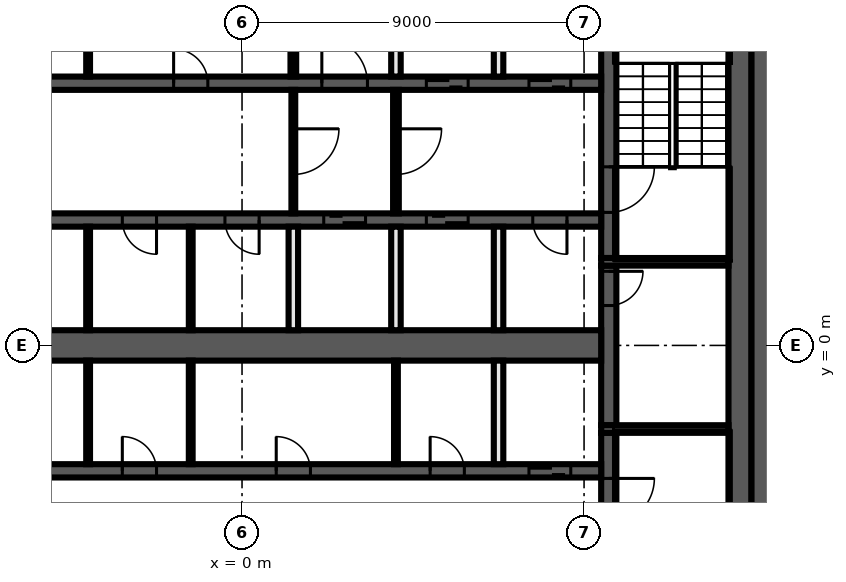
"""IFC4 building model, lengths in metres.
Left out: names, types, materials, properties, quantities, classifications, styles, units other than length and angle.
Written with IfcOpenShell. Run it as: python <this file> out.ifc"""

import sys

from ifc_helpers import new_model, si_unit, direction, frame, frame_2d, origin, place, context, subcontext, project, spatial, rectangle, extrude, element, fill, save


model = new_model("IFC4")
c1 = context("Model", 3, precision=1e-05, world=origin(), true_north=direction((0.0, 1.0)))
c2 = subcontext(c1, "Body", "Model", "MODEL_VIEW")
j1 = project(units=[si_unit("LENGTHUNIT", "METRE"), si_unit("PLANEANGLEUNIT", "RADIAN")], contexts=[c1])
p1 = place(None, origin())
s1 = spatial("IfcSite", under=j1, at=p1, CompositionType="ELEMENT")
p2 = place(p1, origin())
s2 = spatial("IfcBuilding", under=s1, at=p2, CompositionType="ELEMENT")
p3 = place(p2, frame((0.0, 0.0, 353.0)))
s3 = spatial("IfcBuildingStorey", under=s2, at=p3, CompositionType="ELEMENT", Elevation=353.0)
p4 = place(p3, frame((13.7, 10.4, 0.0), z_axis=(0.0, 0.0, 1.0), x_axis=(0.0, -1.0, 0.0)))
e1 = element("IfcWall", 1, at=p4, inside=s3, PredefinedType="SHEAR", context=c2, shape_type="SweptSolid", body=[
    extrude(rectangle(XDim=20.8, YDim=0.6, at=frame_2d((10.4, 0.0))), origin(), (0.0, 0.0, 1.0), 5.6),
])
p5 = place(p3, frame((13.1, 9.8, 0.0), z_axis=(0.0, 0.0, 1.0), x_axis=(0.0, -1.0, 0.0)))
e2 = element("IfcWall", 2, at=p5, inside=s3, PredefinedType="SHEAR", context=c2, shape_type="SweptSolid", body=[
    extrude(rectangle(XDim=19.6, YDim=0.6, at=frame_2d((9.8, 0.0))), origin(), (0.0, 0.0, 1.0), 5.6),
])
p6 = place(p3, frame((9.65, -2.3, 0.0), z_axis=(0.0, 0.0, 1.0), x_axis=(0.0, -1.0, 0.0)))
e3 = element("IfcWall", 3, at=p6, inside=s3, PredefinedType="SHEAR", context=c2, shape_type="SweptSolid", body=[
    extrude(rectangle(XDim=7.5, YDim=0.4, at=frame_2d((3.75, 0.0))), origin(), (0.0, 0.0, 1.0), 5.6),
])
p7 = place(p6, frame((1.2, 0.0, 0.0)))
e4 = element("IfcOpeningElement", 4, at=p7, cuts=e3, PredefinedType="OPENING", context=c2, shape_type="SweptSolid", body=[
    extrude(rectangle(XDim=1.2, YDim=2.1, at=frame_2d((0.6, 1.05))), frame((0.0, 0.21, 0.0), z_axis=(0.0, -1.0, 0.0), x_axis=(1.0, 0.0, 0.0)), (0.0, 0.0, 1.0), 0.42),
])
p8 = place(p3, frame((9.65, 2.1, 0.0), z_axis=(0.0, 0.0, 1.0), x_axis=(0.0, -1.0, 0.0)))
e5 = element("IfcWall", 5, at=p8, inside=s3, PredefinedType="SHEAR", context=c2, shape_type="SweptSolid", body=[
    extrude(rectangle(XDim=4.2, YDim=0.4, at=frame_2d((2.1, 0.0))), origin(), (0.0, 0.0, 1.0), 5.6),
])
p9 = place(p8, frame((0.15, 0.0, 0.0)))
e6 = element("IfcOpeningElement", 6, at=p9, cuts=e5, PredefinedType="OPENING", context=c2, shape_type="SweptSolid", body=[
    extrude(rectangle(XDim=0.9, YDim=2.1, at=frame_2d((0.45, 1.05))), frame((0.0, 0.21, 0.0), z_axis=(0.0, -1.0, 0.0), x_axis=(1.0, 0.0, 0.0)), (0.0, 0.0, 1.0), 0.42),
])
p10 = place(p3, frame((9.65, 9.8, 0.0), z_axis=(0.0, 0.0, 1.0), x_axis=(0.0, -1.0, 0.0)))
e7 = element("IfcWall", 7, at=p10, inside=s3, PredefinedType="SHEAR", context=c2, shape_type="SweptSolid", body=[
    extrude(rectangle(XDim=7.5, YDim=0.4, at=frame_2d((3.75, 0.0))), origin(), (0.0, 0.0, 1.0), 5.6),
])
p11 = place(p10, frame((5.1, 0.0, 0.0)))
e8 = element("IfcOpeningElement", 8, at=p11, cuts=e7, PredefinedType="OPENING", context=c2, shape_type="SweptSolid", body=[
    extrude(rectangle(XDim=1.2, YDim=2.1, at=frame_2d((0.6, 1.05))), frame((0.0, 0.21, 0.0), z_axis=(0.0, -1.0, 0.0), x_axis=(1.0, 0.0, 0.0)), (0.0, 0.0, 1.0), 0.42),
])
for number, where, z_axis, x_axis in (
    (9, (9.45, 2.2, 0.0), (0.0, 0.0, 1.0), (1.0, 0.0, 0.0)),
    (10, (9.45, -2.2, 0.0), (0.0, 0.0, 1.0), (1.0, 0.0, 0.0)),
):
    element("IfcWall", number, at=place(p3, frame(where, z_axis=z_axis, x_axis=x_axis)), inside=s3, PredefinedType="SHEAR", context=c2, shape_type="SweptSolid", body=[
        extrude(rectangle(XDim=3.35, YDim=0.2, at=frame_2d((1.675, 0.0))), origin(), (0.0, 0.0, 1.0), 5.6),
    ])
p12 = place(p3, frame((-9.45, 6.9, 0.0), z_axis=(0.0, 0.0, 1.0), x_axis=(1.0, 0.0, 0.0)))
e11 = element("IfcWall", 11, at=p12, inside=s3, PredefinedType="SHEAR", context=c2, shape_type="SweptSolid", body=[
    extrude(rectangle(XDim=18.9, YDim=0.35, at=frame_2d((9.45, 0.0))), origin(), (0.0, 0.0, 1.0), 5.6),
])
p13 = place(p12, frame((11.55, 0.0, 0.0)))
e12 = element("IfcOpeningElement", 12, at=p13, cuts=e11, PredefinedType="OPENING", context=c2, shape_type="SweptSolid", body=[
    extrude(rectangle(XDim=1.2, YDim=2.1, at=frame_2d((0.6, 1.05))), frame((0.0, 0.185, 0.0), z_axis=(0.0, -1.0, 0.0), x_axis=(1.0, 0.0, 0.0)), (0.0, 0.0, 1.0), 0.37),
])
p14 = place(p12, frame((14.3, 0.0, 0.0)))
e13 = element("IfcOpeningElement", 13, at=p14, cuts=e11, PredefinedType="OPENING", context=c2, shape_type="SweptSolid", body=[
    extrude(rectangle(XDim=1.1, YDim=2.1, at=frame_2d((0.55, 1.05))), frame((0.0, 0.185, 0.0), z_axis=(0.0, -1.0, 0.0), x_axis=(1.0, 0.0, 0.0)), (0.0, 0.0, 1.0), 0.37),
])
p15 = place(p12, frame((17.0, 0.0, 0.0)))
e14 = element("IfcOpeningElement", 14, at=p15, cuts=e11, PredefinedType="OPENING", context=c2, shape_type="SweptSolid", body=[
    extrude(rectangle(XDim=1.1, YDim=2.1, at=frame_2d((0.55, 1.05))), frame((0.0, 0.185, 0.0), z_axis=(0.0, -1.0, 0.0), x_axis=(1.0, 0.0, 0.0)), (0.0, 0.0, 1.0), 0.37),
])
p16 = place(p12, frame((2.25, 0.0, 0.0)))
e15 = element("IfcOpeningElement", 15, at=p16, cuts=e11, PredefinedType="OPENING", context=c2, shape_type="SweptSolid", body=[
    extrude(rectangle(XDim=0.9, YDim=2.1, at=frame_2d((0.45, 1.05))), frame((0.0, 0.185, 0.0), z_axis=(0.0, -1.0, 0.0), x_axis=(1.0, 0.0, 0.0)), (0.0, 0.0, 1.0), 0.37),
])
p17 = place(p12, frame((7.65, 0.0, 0.0)))
e16 = element("IfcOpeningElement", 16, at=p17, cuts=e11, PredefinedType="OPENING", context=c2, shape_type="SweptSolid", body=[
    extrude(rectangle(XDim=0.9, YDim=2.1, at=frame_2d((0.45, 1.05))), frame((0.0, 0.185, 0.0), z_axis=(0.0, -1.0, 0.0), x_axis=(1.0, 0.0, 0.0)), (0.0, 0.0, 1.0), 0.37),
])
p18 = place(p3, frame((9.45, 3.3, 0.0), z_axis=(0.0, 0.0, 1.0), x_axis=(-1.0, 0.0, 0.0)))
e17 = element("IfcWall", 17, at=p18, inside=s3, PredefinedType="SHEAR", context=c2, shape_type="SweptSolid", body=[
    extrude(rectangle(XDim=18.9, YDim=0.35, at=frame_2d((9.45, 0.0))), origin(), (0.0, 0.0, 1.0), 5.6),
])
p19 = place(p18, frame((6.2, 0.0, 0.0)))
e18 = element("IfcOpeningElement", 18, at=p19, cuts=e17, PredefinedType="OPENING", context=c2, shape_type="SweptSolid", body=[
    extrude(rectangle(XDim=1.1, YDim=2.1, at=frame_2d((0.55, 1.05))), frame((0.0, 0.185, 0.0), z_axis=(0.0, -1.0, 0.0), x_axis=(1.0, 0.0, 0.0)), (0.0, 0.0, 1.0), 0.37),
])
p20 = place(p18, frame((3.5, 0.0, 0.0)))
e19 = element("IfcOpeningElement", 19, at=p20, cuts=e17, PredefinedType="OPENING", context=c2, shape_type="SweptSolid", body=[
    extrude(rectangle(XDim=1.1, YDim=2.1, at=frame_2d((0.55, 1.05))), frame((0.0, 0.185, 0.0), z_axis=(0.0, -1.0, 0.0), x_axis=(1.0, 0.0, 0.0)), (0.0, 0.0, 1.0), 0.37),
])
p21 = place(p18, frame((0.9, 0.0, 0.0)))
e20 = element("IfcOpeningElement", 20, at=p21, cuts=e17, PredefinedType="OPENING", context=c2, shape_type="SweptSolid", body=[
    extrude(rectangle(XDim=0.9, YDim=2.1, at=frame_2d((0.45, 1.05))), frame((0.0, 0.185, 0.0), z_axis=(0.0, -1.0, 0.0), x_axis=(1.0, 0.0, 0.0)), (0.0, 0.0, 1.0), 0.37),
])
p22 = place(p18, frame((15.75, 0.0, 0.0)))
e21 = element("IfcOpeningElement", 21, at=p22, cuts=e17, PredefinedType="OPENING", context=c2, shape_type="SweptSolid", body=[
    extrude(rectangle(XDim=0.9, YDim=2.1, at=frame_2d((0.45, 1.05))), frame((0.0, 0.185, 0.0), z_axis=(0.0, -1.0, 0.0), x_axis=(1.0, 0.0, 0.0)), (0.0, 0.0, 1.0), 0.37),
])
p23 = place(p18, frame((11.7, 0.0, 0.0)))
e22 = element("IfcOpeningElement", 22, at=p23, cuts=e17, PredefinedType="OPENING", context=c2, shape_type="SweptSolid", body=[
    extrude(rectangle(XDim=0.9, YDim=2.1, at=frame_2d((0.45, 1.05))), frame((0.0, 0.185, 0.0), z_axis=(0.0, -1.0, 0.0), x_axis=(1.0, 0.0, 0.0)), (0.0, 0.0, 1.0), 0.37),
])
p24 = place(p18, frame((9.0, 0.0, 0.0)))
e23 = element("IfcOpeningElement", 23, at=p24, cuts=e17, PredefinedType="OPENING", context=c2, shape_type="SweptSolid", body=[
    extrude(rectangle(XDim=0.9, YDim=2.1, at=frame_2d((0.45, 1.05))), frame((0.0, 0.185, 0.0), z_axis=(0.0, -1.0, 0.0), x_axis=(1.0, 0.0, 0.0)), (0.0, 0.0, 1.0), 0.37),
])
p25 = place(p3, frame((-9.45, -3.3, 0.0), z_axis=(0.0, 0.0, 1.0), x_axis=(1.0, 0.0, 0.0)))
e24 = element("IfcWall", 24, at=p25, inside=s3, PredefinedType="SHEAR", context=c2, shape_type="SweptSolid", body=[
    extrude(rectangle(XDim=18.9, YDim=0.35, at=frame_2d((9.45, 0.0))), origin(), (0.0, 0.0, 1.0), 5.6),
])
p26 = place(p25, frame((17.0, 0.0, 0.0)))
e25 = element("IfcOpeningElement", 25, at=p26, cuts=e24, PredefinedType="OPENING", context=c2, shape_type="SweptSolid", body=[
    extrude(rectangle(XDim=1.1, YDim=2.1, at=frame_2d((0.55, 1.05))), frame((0.0, 0.185, 0.0), z_axis=(0.0, -1.0, 0.0), x_axis=(1.0, 0.0, 0.0)), (0.0, 0.0, 1.0), 0.37),
])
p27 = place(p25, frame((2.25, 0.0, 0.0)))
e26 = element("IfcOpeningElement", 26, at=p27, cuts=e24, PredefinedType="OPENING", context=c2, shape_type="SweptSolid", body=[
    extrude(rectangle(XDim=0.9, YDim=2.1, at=frame_2d((0.45, 1.05))), frame((0.0, 0.185, 0.0), z_axis=(0.0, -1.0, 0.0), x_axis=(1.0, 0.0, 0.0)), (0.0, 0.0, 1.0), 0.37),
])
p28 = place(p25, frame((6.3, 0.0, 0.0)))
e27 = element("IfcOpeningElement", 27, at=p28, cuts=e24, PredefinedType="OPENING", context=c2, shape_type="SweptSolid", body=[
    extrude(rectangle(XDim=0.9, YDim=2.1, at=frame_2d((0.45, 1.05))), frame((0.0, 0.185, 0.0), z_axis=(0.0, -1.0, 0.0), x_axis=(1.0, 0.0, 0.0)), (0.0, 0.0, 1.0), 0.37),
])
p29 = place(p25, frame((10.35, 0.0, 0.0)))
e28 = element("IfcOpeningElement", 28, at=p29, cuts=e24, PredefinedType="OPENING", context=c2, shape_type="SweptSolid", body=[
    extrude(rectangle(XDim=0.9, YDim=2.1, at=frame_2d((0.45, 1.05))), frame((0.0, 0.185, 0.0), z_axis=(0.0, -1.0, 0.0), x_axis=(1.0, 0.0, 0.0)), (0.0, 0.0, 1.0), 0.37),
])
p30 = place(p25, frame((14.4, 0.0, 0.0)))
e29 = element("IfcOpeningElement", 29, at=p30, cuts=e24, PredefinedType="OPENING", context=c2, shape_type="SweptSolid", body=[
    extrude(rectangle(XDim=0.9, YDim=2.1, at=frame_2d((0.45, 1.05))), frame((0.0, 0.185, 0.0), z_axis=(0.0, -1.0, 0.0), x_axis=(1.0, 0.0, 0.0)), (0.0, 0.0, 1.0), 0.37),
])
p31 = place(p3, frame((-9.45, 0.0, 0.0), z_axis=(0.0, 0.0, 1.0), x_axis=(1.0, 0.0, 0.0)))
e30 = element("IfcWall", 30, at=p31, inside=s3, PredefinedType="SHEAR", context=c2, shape_type="SweptSolid", body=[
    extrude(rectangle(XDim=18.9, YDim=0.8, at=frame_2d((9.45, 0.0))), origin(), (0.0, 0.0, 1.0), 5.6),
])
for number, where, z_axis, x_axis in (
    (31, (6.75, -3.125, 0.0), (0.0, 0.0, 1.0), (0.0, 1.0, 0.0)),
    (32, (6.75, 0.4, 0.0), (0.0, 0.0, 1.0), (0.0, 1.0, 0.0)),
    (33, (6.75, 7.075, 0.0), (0.0, 0.0, 1.0), (0.0, 1.0, 0.0)),
):
    element("IfcWall", number, at=place(p3, frame(where, z_axis=z_axis, x_axis=x_axis)), inside=s3, PredefinedType="SOLIDWALL", context=c2, shape_type="SweptSolid", body=[
        extrude(rectangle(XDim=2.725, YDim=0.25, at=frame_2d((1.363, 0.0))), origin(), (0.0, 0.0, 1.0), 5.6),
    ])
p32 = place(p3, frame((4.05, 6.725, 0.0), z_axis=(0.0, 0.0, 1.0), x_axis=(0.0, -1.0, 0.0)))
e34 = element("IfcWall", 34, at=p32, inside=s3, PredefinedType="PARTITIONING", context=c2, shape_type="SweptSolid", body=[
    extrude(rectangle(XDim=3.25, YDim=0.15, at=frame_2d((1.625, 0.0))), origin(), (0.0, 0.0, 1.0), 5.6),
])
p33 = place(p32, frame((1.025, 0.0, 0.0)))
e35 = element("IfcOpeningElement", 35, at=p33, cuts=e34, PredefinedType="OPENING", context=c2, shape_type="SweptSolid", body=[
    extrude(rectangle(XDim=1.2, YDim=2.1, at=frame_2d((0.6, 1.05))), frame((0.0, 0.085, 0.0), z_axis=(0.0, -1.0, 0.0), x_axis=(1.0, 0.0, 0.0)), (0.0, 0.0, 1.0), 0.17),
])
p34 = place(p3, frame((4.05, -3.125, 0.0), z_axis=(0.0, 0.0, 1.0), x_axis=(0.0, 1.0, 0.0)))
e36 = element("IfcWall", 36, at=p34, inside=s3, PredefinedType="PARTITIONING", context=c2, shape_type="SweptSolid", body=[
    extrude(rectangle(XDim=2.725, YDim=0.1, at=frame_2d((1.363, 0.0))), origin(), (0.0, 0.0, 1.0), 5.6),
])
for number, where, z_axis, x_axis in (
    (37, (4.05, 0.4, 0.0), (0.0, 0.0, 1.0), (0.0, 1.0, 0.0)),
    (38, (4.05, 7.075, 0.0), (0.0, 0.0, 1.0), (0.0, 1.0, 0.0)),
):
    element("IfcWall", number, at=place(p3, frame(where, z_axis=z_axis, x_axis=x_axis)), inside=s3, PredefinedType="SOLIDWALL", context=c2, shape_type="SweptSolid", body=[
        extrude(rectangle(XDim=2.725, YDim=0.25, at=frame_2d((1.363, 0.0))), origin(), (0.0, 0.0, 1.0), 5.6),
    ])
p35 = place(p3, frame((1.35, 7.075, 0.0), z_axis=(0.0, 0.0, 1.0), x_axis=(0.0, 1.0, 0.0)))
e39 = element("IfcWall", 39, at=p35, inside=s3, PredefinedType="PARTITIONING", context=c2, shape_type="SweptSolid", body=[
    extrude(rectangle(XDim=2.725, YDim=0.15, at=frame_2d((1.363, 0.0))), origin(), (0.0, 0.0, 1.0), 5.6),
])
p36 = place(p3, frame((1.35, 6.725, 0.0), z_axis=(0.0, 0.0, 1.0), x_axis=(0.0, -1.0, 0.0)))
e40 = element("IfcWall", 40, at=p36, inside=s3, PredefinedType="PARTITIONING", context=c2, shape_type="SweptSolid", body=[
    extrude(rectangle(XDim=3.25, YDim=0.1, at=frame_2d((1.625, 0.0))), origin(), (0.0, 0.0, 1.0), 5.6),
])
p37 = place(p36, frame((1.025, 0.0, 0.0)))
e41 = element("IfcOpeningElement", 41, at=p37, cuts=e40, PredefinedType="OPENING", context=c2, shape_type="SweptSolid", body=[
    extrude(rectangle(XDim=1.2, YDim=2.1, at=frame_2d((0.6, 1.05))), frame((0.0, 0.06, 0.0), z_axis=(0.0, -1.0, 0.0), x_axis=(1.0, 0.0, 0.0)), (0.0, 0.0, 1.0), 0.12),
])
p38 = place(p3, frame((1.35, 0.4, 0.0), z_axis=(0.0, 0.0, 1.0), x_axis=(0.0, 1.0, 0.0)))
e42 = element("IfcWall", 42, at=p38, inside=s3, PredefinedType="SOLIDWALL", context=c2, shape_type="SweptSolid", body=[
    extrude(rectangle(XDim=2.725, YDim=0.25, at=frame_2d((1.363, 0.0))), origin(), (0.0, 0.0, 1.0), 5.6),
])
for number, where, z_axis, x_axis in (
    (43, (-1.35, -3.125, 0.0), (0.0, 0.0, 1.0), (0.0, 1.0, 0.0)),
    (44, (-1.35, 0.4, 0.0), (0.0, 0.0, 1.0), (0.0, 1.0, 0.0)),
    (45, (-4.05, -3.125, 0.0), (0.0, 0.0, 1.0), (0.0, 1.0, 0.0)),
    (46, (-4.05, 0.4, 0.0), (0.0, 0.0, 1.0), (0.0, 1.0, 0.0)),
    (47, (-4.05, 7.075, 0.0), (0.0, 0.0, 1.0), (0.0, 1.0, 0.0)),
):
    element("IfcWall", number, at=place(p3, frame(where, z_axis=z_axis, x_axis=x_axis)), inside=s3, PredefinedType="PARTITIONING", context=c2, shape_type="SweptSolid", body=[
        extrude(rectangle(XDim=2.725, YDim=0.1, at=frame_2d((1.363, 0.0))), origin(), (0.0, 0.0, 1.0), 5.6),
    ])
p39 = place(p9, origin())
e48 = element("IfcDoor", 48, at=p39, inside=s3, OperationType="SINGLE_SWING_RIGHT", PredefinedType="DOOR", context=c2, shape_type="SweptSolid", body=[
    extrude(rectangle(XDim=0.9, YDim=2.1, at=frame_2d((0.45, 1.05))), frame((0.0, 0.025, 0.0), z_axis=(0.0, -1.0, 0.0), x_axis=(1.0, 0.0, 0.0)), (0.0, 0.0, 1.0), 0.05),
])
fill(e6, e48)
p40 = place(p13, origin())
e49 = element("IfcDoor", 49, at=p40, inside=s3, OperationType="SINGLE_SWING_LEFT", PredefinedType="DOOR", context=c2, shape_type="SweptSolid", body=[
    extrude(rectangle(XDim=1.2, YDim=2.1, at=frame_2d((0.6, 1.05))), frame((0.0, 0.025, 0.0), z_axis=(0.0, -1.0, 0.0), x_axis=(1.0, 0.0, 0.0)), (0.0, 0.0, 1.0), 0.05),
])
fill(e12, e49)
p41 = place(p14, origin())
e50 = element("IfcDoor", 50, at=p41, inside=s3, OperationType="DOUBLE_DOOR_SLIDING", PredefinedType="DOOR", context=c2, shape_type="SweptSolid", body=[
    extrude(rectangle(XDim=1.1, YDim=2.1, at=frame_2d((0.55, 1.05))), frame((0.0, 0.025, 0.0), z_axis=(0.0, -1.0, 0.0), x_axis=(1.0, 0.0, 0.0)), (0.0, 0.0, 1.0), 0.05),
])
fill(e13, e50)
p42 = place(p15, origin())
e51 = element("IfcDoor", 51, at=p42, inside=s3, OperationType="DOUBLE_DOOR_SLIDING", PredefinedType="DOOR", context=c2, shape_type="SweptSolid", body=[
    extrude(rectangle(XDim=1.1, YDim=2.1, at=frame_2d((0.55, 1.05))), frame((0.0, 0.025, 0.0), z_axis=(0.0, -1.0, 0.0), x_axis=(1.0, 0.0, 0.0)), (0.0, 0.0, 1.0), 0.05),
])
fill(e14, e51)
p43 = place(p19, origin())
e52 = element("IfcDoor", 52, at=p43, inside=s3, OperationType="DOUBLE_DOOR_SLIDING", PredefinedType="DOOR", context=c2, shape_type="SweptSolid", body=[
    extrude(rectangle(XDim=1.1, YDim=2.1, at=frame_2d((0.55, 1.05))), frame((0.0, 0.025, 0.0), z_axis=(0.0, -1.0, 0.0), x_axis=(1.0, 0.0, 0.0)), (0.0, 0.0, 1.0), 0.05),
])
fill(e18, e52)
p44 = place(p20, origin())
e53 = element("IfcDoor", 53, at=p44, inside=s3, OperationType="DOUBLE_DOOR_SLIDING", PredefinedType="DOOR", context=c2, shape_type="SweptSolid", body=[
    extrude(rectangle(XDim=1.1, YDim=2.1, at=frame_2d((0.55, 1.05))), frame((0.0, 0.025, 0.0), z_axis=(0.0, -1.0, 0.0), x_axis=(1.0, 0.0, 0.0)), (0.0, 0.0, 1.0), 0.05),
])
fill(e19, e53)
p45 = place(p21, origin())
e54 = element("IfcDoor", 54, at=p45, inside=s3, OperationType="SINGLE_SWING_LEFT", PredefinedType="DOOR", context=c2, shape_type="SweptSolid", body=[
    extrude(rectangle(XDim=0.9, YDim=2.1, at=frame_2d((0.45, 1.05))), frame((0.0, 0.025, 0.0), z_axis=(0.0, -1.0, 0.0), x_axis=(1.0, 0.0, 0.0)), (0.0, 0.0, 1.0), 0.05),
])
fill(e20, e54)
p46 = place(p26, origin())
e55 = element("IfcDoor", 55, at=p46, inside=s3, OperationType="DOUBLE_DOOR_SLIDING", PredefinedType="DOOR", context=c2, shape_type="SweptSolid", body=[
    extrude(rectangle(XDim=1.1, YDim=2.1, at=frame_2d((0.55, 1.05))), frame((0.0, 0.025, 0.0), z_axis=(0.0, -1.0, 0.0), x_axis=(1.0, 0.0, 0.0)), (0.0, 0.0, 1.0), 0.05),
])
fill(e25, e55)
p47 = place(p17, origin())
e56 = element("IfcDoor", 56, at=p47, inside=s3, OperationType="SINGLE_SWING_LEFT", PredefinedType="DOOR", context=c2, shape_type="SweptSolid", body=[
    extrude(rectangle(XDim=0.9, YDim=2.1, at=frame_2d((0.45, 1.05))), frame((0.0, 0.025, 0.0), z_axis=(0.0, -1.0, 0.0), x_axis=(1.0, 0.0, 0.0)), (0.0, 0.0, 1.0), 0.05),
])
fill(e16, e56)
p48 = place(p23, origin())
e57 = element("IfcDoor", 57, at=p48, inside=s3, OperationType="SINGLE_SWING_LEFT", PredefinedType="DOOR", context=c2, shape_type="SweptSolid", body=[
    extrude(rectangle(XDim=0.9, YDim=2.1, at=frame_2d((0.45, 1.05))), frame((0.0, 0.025, 0.0), z_axis=(0.0, -1.0, 0.0), x_axis=(1.0, 0.0, 0.0)), (0.0, 0.0, 1.0), 0.05),
])
fill(e22, e57)
p49 = place(p24, origin())
e58 = element("IfcDoor", 58, at=p49, inside=s3, OperationType="SINGLE_SWING_RIGHT", PredefinedType="DOOR", context=c2, shape_type="SweptSolid", body=[
    extrude(rectangle(XDim=0.9, YDim=2.1, at=frame_2d((0.45, 1.05))), frame((0.0, 0.025, 0.0), z_axis=(0.0, -1.0, 0.0), x_axis=(1.0, 0.0, 0.0)), (0.0, 0.0, 1.0), 0.05),
])
fill(e23, e58)
p50 = place(p28, origin())
e59 = element("IfcDoor", 59, at=p50, inside=s3, OperationType="SINGLE_SWING_RIGHT", PredefinedType="DOOR", context=c2, shape_type="SweptSolid", body=[
    extrude(rectangle(XDim=0.9, YDim=2.1, at=frame_2d((0.45, 1.05))), frame((0.0, 0.025, 0.0), z_axis=(0.0, -1.0, 0.0), x_axis=(1.0, 0.0, 0.0)), (0.0, 0.0, 1.0), 0.05),
])
fill(e27, e59)
p51 = place(p29, origin())
e60 = element("IfcDoor", 60, at=p51, inside=s3, OperationType="SINGLE_SWING_LEFT", PredefinedType="DOOR", context=c2, shape_type="SweptSolid", body=[
    extrude(rectangle(XDim=0.9, YDim=2.1, at=frame_2d((0.45, 1.05))), frame((0.0, 0.025, 0.0), z_axis=(0.0, -1.0, 0.0), x_axis=(1.0, 0.0, 0.0)), (0.0, 0.0, 1.0), 0.05),
])
fill(e28, e60)
p52 = place(p30, origin())
e61 = element("IfcDoor", 61, at=p52, inside=s3, OperationType="SINGLE_SWING_RIGHT", PredefinedType="DOOR", context=c2, shape_type="SweptSolid", body=[
    extrude(rectangle(XDim=0.9, YDim=2.1, at=frame_2d((0.45, 1.05))), frame((0.0, 0.025, 0.0), z_axis=(0.0, -1.0, 0.0), x_axis=(1.0, 0.0, 0.0)), (0.0, 0.0, 1.0), 0.05),
])
fill(e29, e61)
p53 = place(p11, origin())
e62 = element("IfcDoor", 62, at=p53, inside=s3, OperationType="SINGLE_SWING_LEFT", PredefinedType="DOOR", context=c2, shape_type="SweptSolid", body=[
    extrude(rectangle(XDim=1.2, YDim=2.1, at=frame_2d((0.6, 1.05))), frame((0.0, 0.025, 0.0), z_axis=(0.0, -1.0, 0.0), x_axis=(1.0, 0.0, 0.0)), (0.0, 0.0, 1.0), 0.05),
])
fill(e8, e62)
p54 = place(p7, origin())
e63 = element("IfcDoor", 63, at=p54, inside=s3, OperationType="SINGLE_SWING_RIGHT", PredefinedType="DOOR", context=c2, shape_type="SweptSolid", body=[
    extrude(rectangle(XDim=1.2, YDim=2.1, at=frame_2d((0.6, 1.05))), frame((0.0, 0.025, 0.0), z_axis=(0.0, -1.0, 0.0), x_axis=(1.0, 0.0, 0.0)), (0.0, 0.0, 1.0), 0.05),
])
fill(e4, e63)
p55 = place(p37, origin())
e64 = element("IfcDoor", 64, at=p55, inside=s3, OperationType="SINGLE_SWING_LEFT", PredefinedType="DOOR", context=c2, shape_type="SweptSolid", body=[
    extrude(rectangle(XDim=1.2, YDim=2.1, at=frame_2d((0.6, 1.05))), frame((0.0, 0.025, 0.0), z_axis=(0.0, -1.0, 0.0), x_axis=(1.0, 0.0, 0.0)), (0.0, 0.0, 1.0), 0.05),
])
fill(e41, e64)
p56 = place(p33, origin())
e65 = element("IfcDoor", 65, at=p56, inside=s3, OperationType="SINGLE_SWING_RIGHT", PredefinedType="DOOR", context=c2, shape_type="SweptSolid", body=[
    extrude(rectangle(XDim=1.2, YDim=2.1, at=frame_2d((0.6, 1.05))), frame((0.0, 0.025, 0.0), z_axis=(0.0, -1.0, 0.0), x_axis=(1.0, 0.0, 0.0)), (0.0, 0.0, 1.0), 0.05),
])
fill(e35, e65)
save(model, sys.argv[1])
